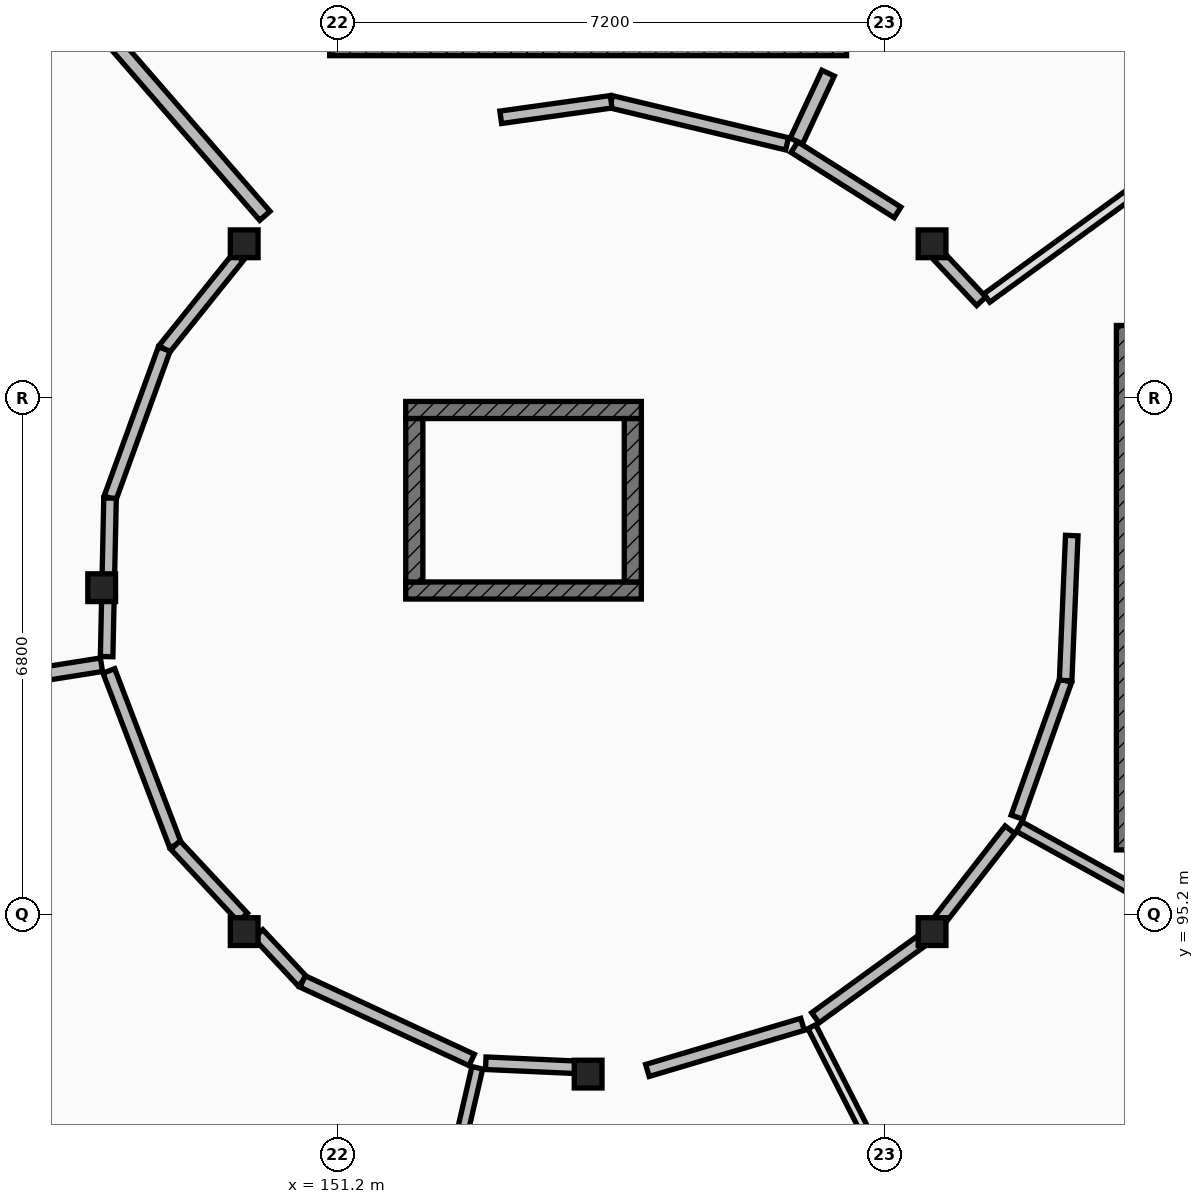
"""IFC4 building model, lengths in metres.
Left out: names, types, materials, properties, quantities, classifications, styles, units other than length and angle.
Written with IfcOpenShell. Run it as: python <this file> out.ifc"""

import sys

from ifc_helpers import new_model, si_unit, direction, frame, frame_2d, origin, origin_2d, place, context, subcontext, project, spatial, rectangle, extrude, element, fill, save


model = new_model("IFC4")
c1 = context("Model", 3, precision=1e-05, world=origin(), true_north=direction((0.0, 1.0)))
c2 = subcontext(c1, "Body", "Model", "MODEL_VIEW")
j1 = project(units=[si_unit("LENGTHUNIT", "METRE"), si_unit("PLANEANGLEUNIT", "RADIAN")], contexts=[c1])
p1 = place(None, origin())
s1 = spatial("IfcSite", under=j1, at=p1, CompositionType="ELEMENT")
p2 = place(p1, origin())
s2 = spatial("IfcBuilding", under=s1, at=p2, CompositionType="ELEMENT")
p3 = place(p2, frame((0.0, 0.0, 8.75)))
s3 = spatial("IfcBuildingStorey", under=s2, at=p3, CompositionType="ELEMENT", Elevation=8.75)
for number, where, z_axis, x_axis in (
    (1, (159.025, 104.025, 0.0), (0.0, 0.0, 1.0), (1.0, 0.0, 0.0)),
    (2, (149.975, 104.025, 0.0), (0.0, 0.0, 1.0), (1.0, 0.0, 0.0)),
    (3, (148.1, 99.5, 0.0), (0.0, 0.0, 1.0), (1.0, 0.0, 0.0)),
    (4, (149.975, 94.975, 0.0), (0.0, 0.0, 1.0), (1.0, 0.0, 0.0)),
    (5, (154.5, 93.1, 0.0), (0.0, 0.0, 1.0), (1.0, 0.0, 0.0)),
    (6, (159.025, 94.975, 0.0), (0.0, 0.0, 1.0), (1.0, 0.0, 0.0)),
):
    element("IfcColumn", number, at=place(p3, frame(where, z_axis=z_axis, x_axis=x_axis)), inside=s3, PredefinedType="COLUMN", context=c2, shape_type="SweptSolid", body=[
        extrude(rectangle(XDim=0.365, YDim=0.365, at=origin_2d()), origin(), (0.0, 0.0, 1.0), 4.2),
    ])
p4 = place(p3, frame((161.575, 102.95, 0.0), z_axis=(0.0, 0.0, 1.0), x_axis=(0.0, -1.0, 0.0)))
e7 = element("IfcWall", 7, at=p4, inside=s3, PredefinedType="SHEAR", context=c2, shape_type="SweptSolid", body=[
    extrude(rectangle(XDim=6.9, YDim=0.25, at=frame_2d((3.45, 0.0))), origin(), (0.0, 0.0, 1.0), 3.975),
])
p5 = place(p4, frame((0.43, 0.0, 0.0)))
e8 = element("IfcOpeningElement", 8, at=p5, cuts=e7, PredefinedType="OPENING", context=c2, shape_type="SweptSolid", body=[
    extrude(rectangle(XDim=1.1, YDim=2.15, at=frame_2d((0.55, 1.075))), frame((0.0, 0.135, 0.0), z_axis=(0.0, -1.0, 0.0), x_axis=(1.0, 0.0, 0.0)), (0.0, 0.0, 1.0), 0.27),
])
p6 = place(p3, frame((151.1, 106.6, 0.0), z_axis=(0.0, 0.0, 1.0), x_axis=(1.0, 0.0, 0.0)))
e9 = element("IfcWall", 9, at=p6, inside=s3, PredefinedType="SHEAR", context=c2, shape_type="SweptSolid", body=[
    extrude(rectangle(XDim=6.8, YDim=0.2, at=frame_2d((3.4, 0.0))), origin(), (0.0, 0.0, 1.0), 3.975),
])
p7 = place(p6, frame((0.38, 0.0, 0.0)))
e10 = element("IfcOpeningElement", 10, at=p7, cuts=e9, PredefinedType="OPENING", context=c2, shape_type="SweptSolid", body=[
    extrude(rectangle(XDim=1.05, YDim=2.15, at=frame_2d((0.525, 1.075))), frame((0.0, 0.11, 0.0), z_axis=(0.0, -1.0, 0.0), x_axis=(1.0, 0.0, 0.0)), (0.0, 0.0, 1.0), 0.22),
])
p8 = place(p3, frame((152.1, 99.463, 0.0), z_axis=(0.0, 0.0, 1.0), x_axis=(1.0, 0.0, 0.0)))
e11 = element("IfcWall", 11, at=p8, inside=s3, PredefinedType="SHEAR", context=c2, shape_type="SweptSolid", body=[
    extrude(rectangle(XDim=3.1, YDim=0.225, at=frame_2d((1.55, 0.0))), origin(), (0.0, 0.0, 1.0), 3.975),
])
p9 = place(p8, frame((0.9, 0.0, 0.0)))
e12 = element("IfcOpeningElement", 12, at=p9, cuts=e11, PredefinedType="OPENING", context=c2, shape_type="SweptSolid", body=[
    extrude(rectangle(XDim=1.3, YDim=2.2, at=frame_2d((0.65, 1.1))), frame((0.0, 0.123, 0.0), z_axis=(0.0, -1.0, 0.0), x_axis=(1.0, 0.0, 0.0)), (0.0, 0.0, 1.0), 0.245),
])
p10 = place(p3, frame((152.1, 101.838, 0.0), z_axis=(0.0, 0.0, 1.0), x_axis=(1.0, 0.0, 0.0)))
e13 = element("IfcWall", 13, at=p10, inside=s3, PredefinedType="SHEAR", context=c2, shape_type="SweptSolid", body=[
    extrude(rectangle(XDim=3.1, YDim=0.225, at=frame_2d((1.55, 0.0))), origin(), (0.0, 0.0, 1.0), 3.975),
])
for number, where, z_axis, x_axis in (
    (14, (152.213, 99.575, 0.0), (0.0, 0.0, 1.0), (0.0, 1.0, 0.0)),
    (15, (155.088, 99.575, 0.0), (0.0, 0.0, 1.0), (0.0, 1.0, 0.0)),
):
    element("IfcWall", number, at=place(p3, frame(where, z_axis=z_axis, x_axis=x_axis)), inside=s3, PredefinedType="SHEAR", context=c2, shape_type="SweptSolid", body=[
        extrude(rectangle(XDim=2.15, YDim=0.225, at=frame_2d((1.075, 0.0))), origin(), (0.0, 0.0, 1.0), 3.975),
    ])
p11 = place(p3, frame((157.24, 105.376, 0.0), z_axis=(0.0, 0.0, 1.0), x_axis=(0.422695781641, 0.906271634877, 0.0)))
e16 = element("IfcWall", 16, at=p11, inside=s3, PredefinedType="PARTITIONING", context=c2, shape_type="SweptSolid", body=[
    extrude(rectangle(XDim=0.987, YDim=0.18, at=frame_2d((0.493, 0.0))), origin(), (0.0, 0.0, 1.0), 3.304),
])
p12 = place(p3, frame((150.247, 104.393, 0.0), z_axis=(0.0, 0.0, 1.0), x_axis=(-0.656100617129, 0.754673426193, 0.0)))
e17 = element("IfcWall", 17, at=p12, inside=s3, PredefinedType="PARTITIONING", context=c2, shape_type="SweptSolid", body=[
    extrude(rectangle(XDim=5.263, YDim=0.18, at=frame_2d((2.632, 0.0))), origin(), (0.0, 0.0, 1.0), 3.304),
])
p13 = place(p3, frame((148.097, 98.486, 0.0), z_axis=(0.0, 0.0, 1.0), x_axis=(-0.98768185006, -0.156475439167, 0.0)))
e18 = element("IfcWall", 18, at=p13, inside=s3, PredefinedType="PARTITIONING", context=c2, shape_type="SweptSolid", body=[
    extrude(rectangle(XDim=5.28, YDim=0.18, at=frame_2d((2.64, 0.0))), origin(), (0.0, 0.0, 1.0), 3.304),
])
p14 = place(p3, frame((153.042, 93.183, 0.0), z_axis=(0.0, 0.0, 1.0), x_axis=(-0.224943840984, -0.974371730093, 0.0)))
e19 = element("IfcWall", 19, at=p14, inside=s3, PredefinedType="PARTITIONING", context=c2, shape_type="SweptSolid", body=[
    extrude(rectangle(XDim=5.286, YDim=0.145, at=frame_2d((2.643, 0.0))), origin(), (0.0, 0.0, 1.0), 3.304),
])
p15 = place(p3, frame((157.443, 93.724, 0.0), z_axis=(0.0, 0.0, 1.0), x_axis=(0.454011967175, -0.890995585658, 0.0)))
e20 = element("IfcWall", 20, at=p15, inside=s3, PredefinedType="PARTITIONING", context=c2, shape_type="SweptSolid", body=[
    extrude(rectangle(XDim=5.262, YDim=0.115, at=frame_2d((2.631, 0.0))), origin(), (0.0, 0.0, 1.0), 3.304),
])
p16 = place(p3, frame((160.17, 96.357, 0.0), z_axis=(0.0, 0.0, 1.0), x_axis=(0.874649389138, -0.484756068638, 0.0)))
e21 = element("IfcWall", 21, at=p16, inside=s3, PredefinedType="PARTITIONING", context=c2, shape_type="SweptSolid", body=[
    extrude(rectangle(XDim=5.26, YDim=0.145, at=frame_2d((2.63, 0.0))), origin(), (0.0, 0.0, 1.0), 3.304),
])
p17 = place(p3, frame((159.745, 103.311, 0.0), z_axis=(0.0, 0.0, 1.0), x_axis=(0.809019962828, 0.587781166545, 0.0)))
e22 = element("IfcWall", 22, at=p17, inside=s3, PredefinedType="PLUMBINGWALL", context=c2, shape_type="SweptSolid", body=[
    extrude(rectangle(XDim=5.279, YDim=0.135, at=frame_2d((2.64, 0.0))), origin(), (0.0, 0.0, 1.0), 3.304),
])
p18 = place(p3, frame((157.118, 105.34, 0.0), z_axis=(0.0, 0.0, 1.0), x_axis=(-0.972635355986, 0.232336962804, 0.0)))
e23 = element("IfcWall", 23, at=p18, inside=s3, PredefinedType="PARTITIONING", context=c2, shape_type="SweptSolid", body=[
    extrude(rectangle(XDim=2.38, YDim=0.165, at=frame_2d((1.19, 0.0))), origin(), (0.0, 0.0, 1.0), 3.304),
])
p19 = place(p3, frame((154.803, 105.893, 0.0), z_axis=(0.0, 0.0, 1.0), x_axis=(-0.99027628892, -0.139114598813, 0.0)))
e24 = element("IfcWall", 24, at=p19, inside=s3, PredefinedType="PARTITIONING", context=c2, shape_type="SweptSolid", body=[
    extrude(rectangle(XDim=1.467, YDim=0.165, at=frame_2d((0.733, 0.0))), origin(), (0.0, 0.0, 1.0), 3.304),
])
p20 = place(p3, frame((149.898, 103.854, 0.0), z_axis=(0.0, 0.0, 1.0), x_axis=(-0.626089924076, -0.779750862116, 0.0)))
e25 = element("IfcWall", 25, at=p20, inside=s3, PredefinedType="PARTITIONING", context=c2, shape_type="SweptSolid", body=[
    extrude(rectangle(XDim=1.557, YDim=0.165, at=frame_2d((0.779, 0.0))), origin(), (0.0, 0.0, 1.0), 3.304),
])
p21 = place(p20, frame((0.328, 0.0, 0.0)))
e26 = element("IfcOpeningElement", 26, at=p21, cuts=e25, PredefinedType="OPENING", context=c2, shape_type="SweptSolid", body=[
    extrude(rectangle(XDim=0.9, YDim=2.1, at=frame_2d((0.45, 1.05))), frame((0.0, 0.093, 0.0), z_axis=(0.0, -1.0, 0.0), x_axis=(1.0, 0.0, 0.0)), (0.0, 0.0, 1.0), 0.185),
])
p22 = place(p3, frame((148.923, 102.64, 0.0), z_axis=(0.0, 0.0, 1.0), x_axis=(-0.34177124659, -0.939783174463, 0.0)))
e27 = element("IfcWall", 27, at=p22, inside=s3, PredefinedType="PARTITIONING", context=c2, shape_type="SweptSolid", body=[
    extrude(rectangle(XDim=2.087, YDim=0.165, at=frame_2d((1.043, 0.0))), origin(), (0.0, 0.0, 1.0), 3.304),
])
p23 = place(p3, frame((148.21, 100.679, 0.0), z_axis=(0.0, 0.0, 1.0), x_axis=(-0.02168687228, -0.999764812129, 0.0)))
e28 = element("IfcWall", 28, at=p23, inside=s3, PredefinedType="PARTITIONING", context=c2, shape_type="SweptSolid", body=[
    extrude(rectangle(XDim=1.013, YDim=0.165, at=frame_2d((0.507, 0.0))), origin(), (0.0, 0.0, 1.0), 3.304),
])
p24 = place(p3, frame((148.181, 99.331, 0.0), z_axis=(0.0, 0.0, 1.0), x_axis=(-0.021496850658, -0.999768916006, 0.0)))
e29 = element("IfcWall", 29, at=p24, inside=s3, PredefinedType="PARTITIONING", context=c2, shape_type="SweptSolid", body=[
    extrude(rectangle(XDim=0.738, YDim=0.165, at=frame_2d((0.369, 0.0))), origin(), (0.0, 0.0, 1.0), 3.304),
])
p25 = place(p3, frame((148.194, 98.405, 0.0), z_axis=(0.0, 0.0, 1.0), x_axis=(0.357004696351, -0.934102589004, 0.0)))
e30 = element("IfcWall", 30, at=p25, inside=s3, PredefinedType="PARTITIONING", context=c2, shape_type="SweptSolid", body=[
    extrude(rectangle(XDim=2.454, YDim=0.165, at=frame_2d((1.227, 0.0))), origin(), (0.0, 0.0, 1.0), 3.304),
])
p26 = place(p25, frame((0.477, 0.0, 0.0)))
e31 = element("IfcOpeningElement", 31, at=p26, cuts=e30, PredefinedType="OPENING", context=c2, shape_type="SweptSolid", body=[
    extrude(rectangle(XDim=1.5, YDim=2.3, at=frame_2d((0.75, 1.15))), frame((0.0, 0.093, 0.0), z_axis=(0.0, -1.0, 0.0), x_axis=(1.0, 0.0, 0.0)), (0.0, 0.0, 1.0), 0.185),
])
p27 = place(p3, frame((149.07, 96.113, 0.0), z_axis=(0.0, 0.0, 1.0), x_axis=(0.682084089324, -0.731273748395, 0.0)))
e32 = element("IfcWall", 32, at=p27, inside=s3, PredefinedType="PARTITIONING", context=c2, shape_type="SweptSolid", body=[
    extrude(rectangle(XDim=1.3, YDim=0.165, at=frame_2d((0.65, 0.0))), origin(), (0.0, 0.0, 1.0), 3.304),
])
p28 = place(p3, frame((150.16, 94.944, 0.0), z_axis=(0.0, 0.0, 1.0), x_axis=(0.682114678072, -0.731245216024, 0.0)))
e33 = element("IfcWall", 33, at=p28, inside=s3, PredefinedType="PARTITIONING", context=c2, shape_type="SweptSolid", body=[
    extrude(rectangle(XDim=0.855, YDim=0.165, at=frame_2d((0.427, 0.0))), origin(), (0.0, 0.0, 1.0), 3.304),
])
p29 = place(p3, frame((150.743, 94.319, 0.0), z_axis=(0.0, 0.0, 1.0), x_axis=(0.906989961647, -0.421152240255, 0.0)))
e34 = element("IfcWall", 34, at=p29, inside=s3, PredefinedType="PARTITIONING", context=c2, shape_type="SweptSolid", body=[
    extrude(rectangle(XDim=2.453, YDim=0.165, at=frame_2d((1.227, 0.0))), origin(), (0.0, 0.0, 1.0), 3.304),
])
p30 = place(p3, frame((153.153, 93.243, 0.0), z_axis=(0.0, 0.0, 1.0), x_axis=(0.998998504247, -0.044743586258, 0.0)))
e35 = element("IfcWall", 35, at=p30, inside=s3, PredefinedType="PARTITIONING", context=c2, shape_type="SweptSolid", body=[
    extrude(rectangle(XDim=1.184, YDim=0.165, at=frame_2d((0.592, 0.0))), origin(), (0.0, 0.0, 1.0), 3.304),
])
p31 = place(p3, frame((155.28, 93.148, 0.0), z_axis=(0.0, 0.0, 1.0), x_axis=(0.958517732376, 0.285032904628, 0.0)))
e36 = element("IfcWall", 36, at=p31, inside=s3, PredefinedType="PARTITIONING", context=c2, shape_type="SweptSolid", body=[
    extrude(rectangle(XDim=2.129, YDim=0.165, at=frame_2d((1.065, 0.0))), origin(), (0.0, 0.0, 1.0), 3.304),
])
p32 = place(p31, frame((0.5, 0.0, 0.0)))
e37 = element("IfcOpeningElement", 37, at=p32, cuts=e36, PredefinedType="OPENING", context=c2, shape_type="SweptSolid", body=[
    extrude(rectangle(XDim=1.13, YDim=2.14, at=frame_2d((0.565, 1.07))), frame((0.0, 0.093, 0.0), z_axis=(0.0, -1.0, 0.0), x_axis=(1.0, 0.0, 0.0)), (0.0, 0.0, 1.0), 0.185),
])
p33 = place(p3, frame((157.49, 93.841, 0.0), z_axis=(0.0, 0.0, 1.0), x_axis=(0.809526218979, 0.587083725533, 0.0)))
e38 = element("IfcWall", 38, at=p33, inside=s3, PredefinedType="PARTITIONING", context=c2, shape_type="SweptSolid", body=[
    extrude(rectangle(XDim=1.722, YDim=0.165, at=frame_2d((0.861, 0.0))), origin(), (0.0, 0.0, 1.0), 3.304),
])
p34 = place(p33, frame((0.421, 0.0, 0.0)))
e39 = element("IfcOpeningElement", 39, at=p34, cuts=e38, PredefinedType="OPENING", context=c2, shape_type="SweptSolid", body=[
    extrude(rectangle(XDim=0.88, YDim=2.1, at=frame_2d((0.44, 1.05))), frame((0.0, 0.093, 0.0), z_axis=(0.0, -1.0, 0.0), x_axis=(1.0, 0.0, 0.0)), (0.0, 0.0, 1.0), 0.185),
])
p35 = place(p3, frame((159.129, 95.131, 0.0), z_axis=(0.0, 0.0, 1.0), x_axis=(0.61450363649, 0.788913988176, 0.0)))
e40 = element("IfcWall", 40, at=p35, inside=s3, PredefinedType="PARTITIONING", context=c2, shape_type="SweptSolid", body=[
    extrude(rectangle(XDim=1.5, YDim=0.165, at=frame_2d((0.75, 0.0))), origin(), (0.0, 0.0, 1.0), 3.304),
])
p36 = place(p3, frame((160.143, 96.481, 0.0), z_axis=(0.0, 0.0, 1.0), x_axis=(0.334820358273, 0.942281978861, 0.0)))
e41 = element("IfcWall", 41, at=p36, inside=s3, PredefinedType="PARTITIONING", context=c2, shape_type="SweptSolid", body=[
    extrude(rectangle(XDim=1.908, YDim=0.165, at=frame_2d((0.954, 0.0))), origin(), (0.0, 0.0, 1.0), 3.304),
])
p37 = place(p36, frame((0.369, 0.0, 0.0)))
e42 = element("IfcOpeningElement", 42, at=p37, cuts=e41, PredefinedType="OPENING", context=c2, shape_type="SweptSolid", body=[
    extrude(rectangle(XDim=1.17, YDim=2.24, at=frame_2d((0.585, 1.12))), frame((0.0, 0.093, 0.0), z_axis=(0.0, -1.0, 0.0), x_axis=(1.0, 0.0, 0.0)), (0.0, 0.0, 1.0), 0.185),
])
p38 = place(p3, frame((160.782, 98.279, 0.0), z_axis=(0.0, 0.0, 1.0), x_axis=(0.042465818656, 0.999097920249, 0.0)))
e43 = element("IfcWall", 43, at=p38, inside=s3, PredefinedType="PARTITIONING", context=c2, shape_type="SweptSolid", body=[
    extrude(rectangle(XDim=1.909, YDim=0.165, at=frame_2d((0.954, 0.0))), origin(), (0.0, 0.0, 1.0), 3.304),
])
p39 = place(p3, frame((159.672, 103.269, 0.0), z_axis=(0.0, 0.0, 1.0), x_axis=(-0.685308492068, 0.728252889249, 0.0)))
e44 = element("IfcWall", 44, at=p39, inside=s3, PredefinedType="PARTITIONING", context=c2, shape_type="SweptSolid", body=[
    extrude(rectangle(XDim=0.813, YDim=0.165, at=frame_2d((0.406, 0.0))), origin(), (0.0, 0.0, 1.0), 3.304),
])
p40 = place(p3, frame((158.571, 104.438, 0.0), z_axis=(0.0, 0.0, 1.0), x_axis=(-0.84510965167, 0.53459300094, 0.0)))
e45 = element("IfcWall", 45, at=p40, inside=s3, PredefinedType="PARTITIONING", context=c2, shape_type="SweptSolid", body=[
    extrude(rectangle(XDim=1.607, YDim=0.165, at=frame_2d((0.804, 0.0))), origin(), (0.0, 0.0, 1.0), 3.304),
])
p41 = place(p40, frame((0.333, 0.0, 0.0)))
e46 = element("IfcOpeningElement", 46, at=p41, cuts=e45, PredefinedType="OPENING", context=c2, shape_type="SweptSolid", body=[
    extrude(rectangle(XDim=0.94, YDim=2.1, at=frame_2d((0.47, 1.05))), frame((0.0, 0.093, 0.0), z_axis=(0.0, -1.0, 0.0), x_axis=(1.0, 0.0, 0.0)), (0.0, 0.0, 1.0), 0.185),
])
p42 = place(p5, origin())
e47 = element("IfcDoor", 47, at=p42, inside=s3, OperationType="SINGLE_SWING_RIGHT", PredefinedType="DOOR", context=c2, shape_type="SweptSolid", body=[
    extrude(rectangle(XDim=1.1, YDim=2.15, at=frame_2d((0.55, 1.075))), frame((0.0, 0.025, 0.0), z_axis=(0.0, -1.0, 0.0), x_axis=(1.0, 0.0, 0.0)), (0.0, 0.0, 1.0), 0.05),
])
fill(e8, e47)
p43 = place(p9, origin())
e48 = element("IfcDoor", 48, at=p43, inside=s3, OperationType="DOUBLE_DOOR_SLIDING", PredefinedType="DOOR", context=c2, shape_type="SweptSolid", body=[
    extrude(rectangle(XDim=1.3, YDim=2.2, at=frame_2d((0.65, 1.1))), frame((0.0, 0.025, 0.0), z_axis=(0.0, -1.0, 0.0), x_axis=(1.0, 0.0, 0.0)), (0.0, 0.0, 1.0), 0.05),
])
fill(e12, e48)
p44 = place(p21, origin())
e49 = element("IfcDoor", 49, at=p44, inside=s3, OperationType="SINGLE_SWING_LEFT", PredefinedType="DOOR", context=c2, shape_type="SweptSolid", body=[
    extrude(rectangle(XDim=0.9, YDim=2.1, at=frame_2d((0.45, 1.05))), frame((0.0, 0.025, 0.0), z_axis=(0.0, -1.0, 0.0), x_axis=(1.0, 0.0, 0.0)), (0.0, 0.0, 1.0), 0.05),
])
fill(e26, e49)
p45 = place(p26, origin())
e50 = element("IfcDoor", 50, at=p45, inside=s3, OperationType="SINGLE_SWING_RIGHT", PredefinedType="DOOR", context=c2, shape_type="SweptSolid", body=[
    extrude(rectangle(XDim=1.5, YDim=2.3, at=frame_2d((0.75, 1.15))), frame((0.0, 0.025, 0.0), z_axis=(0.0, -1.0, 0.0), x_axis=(1.0, 0.0, 0.0)), (0.0, 0.0, 1.0), 0.05),
])
fill(e31, e50)
p46 = place(p32, origin())
e51 = element("IfcDoor", 51, at=p46, inside=s3, OperationType="SINGLE_SWING_LEFT", PredefinedType="DOOR", context=c2, shape_type="SweptSolid", body=[
    extrude(rectangle(XDim=1.13, YDim=2.14, at=frame_2d((0.565, 1.07))), frame((0.0, 0.025, 0.0), z_axis=(0.0, -1.0, 0.0), x_axis=(1.0, 0.0, 0.0)), (0.0, 0.0, 1.0), 0.05),
])
fill(e37, e51)
p47 = place(p34, origin())
e52 = element("IfcDoor", 52, at=p47, inside=s3, OperationType="SINGLE_SWING_RIGHT", PredefinedType="DOOR", context=c2, shape_type="SweptSolid", body=[
    extrude(rectangle(XDim=0.88, YDim=2.1, at=frame_2d((0.44, 1.05))), frame((0.0, 0.025, 0.0), z_axis=(0.0, -1.0, 0.0), x_axis=(1.0, 0.0, 0.0)), (0.0, 0.0, 1.0), 0.05),
])
fill(e39, e52)
p48 = place(p37, origin())
e53 = element("IfcDoor", 53, at=p48, inside=s3, OperationType="SINGLE_SWING_LEFT", PredefinedType="DOOR", context=c2, shape_type="SweptSolid", body=[
    extrude(rectangle(XDim=1.17, YDim=2.24, at=frame_2d((0.585, 1.12))), frame((0.0, 0.025, 0.0), z_axis=(0.0, -1.0, 0.0), x_axis=(1.0, 0.0, 0.0)), (0.0, 0.0, 1.0), 0.05),
])
fill(e42, e53)
p49 = place(p41, origin())
e54 = element("IfcDoor", 54, at=p49, inside=s3, OperationType="SINGLE_SWING_RIGHT", PredefinedType="DOOR", context=c2, shape_type="SweptSolid", body=[
    extrude(rectangle(XDim=0.94, YDim=2.1, at=frame_2d((0.47, 1.05))), frame((0.0, 0.025, 0.0), z_axis=(0.0, -1.0, 0.0), x_axis=(1.0, 0.0, 0.0)), (0.0, 0.0, 1.0), 0.05),
])
fill(e46, e54)
save(model, sys.argv[1])
